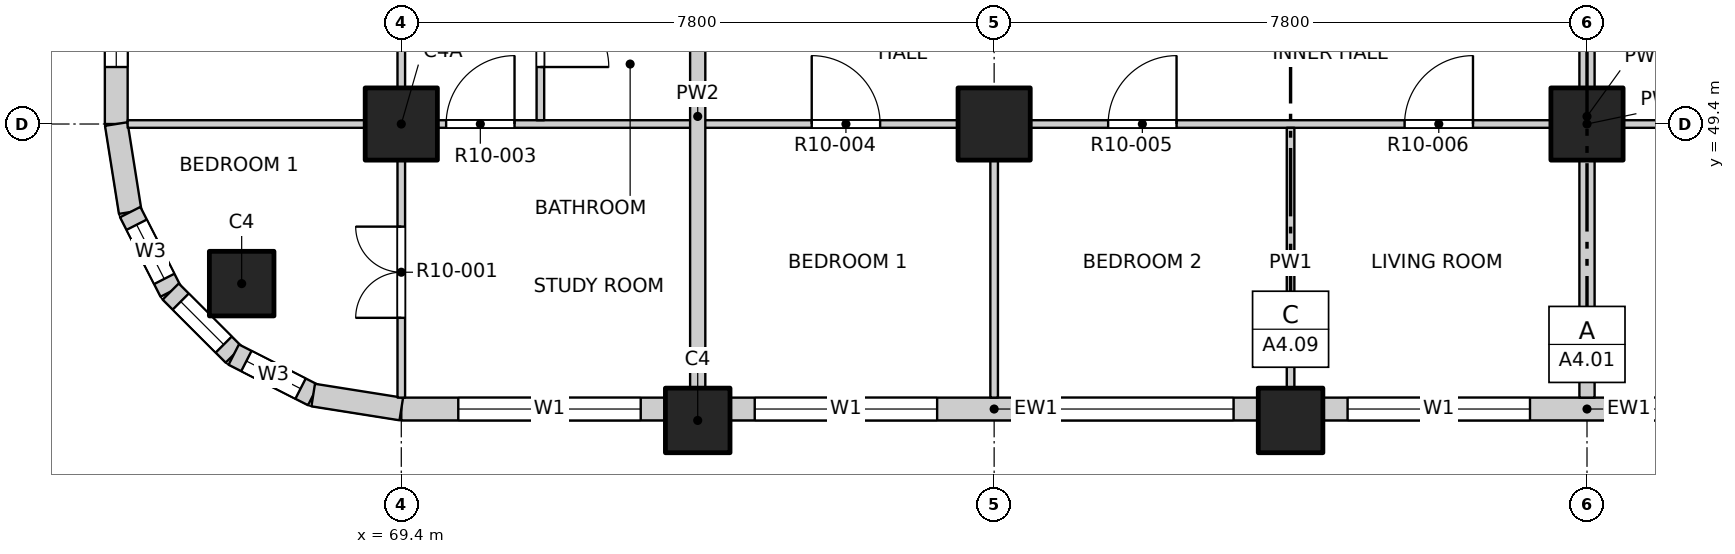
"""IFC4 building model, lengths in metres.
Left out: names, types, materials, properties, quantities, classifications, styles, units other than length and angle.
Written with IfcOpenShell. Run it as: python <this file> out.ifc"""

import sys

from ifc_helpers import new_model, si_unit, direction, frame, frame_2d, origin, origin_2d, place, context, subcontext, project, spatial, rectangle, extrude, element, fill, save


model = new_model("IFC4")
c1 = context("Model", 3, precision=1e-05, world=origin(), true_north=direction((0.0, 1.0)))
c2 = subcontext(c1, "Body", "Model", "MODEL_VIEW")
j1 = project(units=[si_unit("LENGTHUNIT", "METRE"), si_unit("PLANEANGLEUNIT", "RADIAN")], contexts=[c1])
p1 = place(None, origin())
s1 = spatial("IfcSite", under=j1, at=p1, CompositionType="ELEMENT")
p2 = place(p1, origin())
s2 = spatial("IfcBuilding", under=s1, at=p2, CompositionType="ELEMENT")
p3 = place(p2, frame((0.0, 0.0, 127.1)))
s3 = spatial("IfcBuildingStorey", under=s2, at=p3, CompositionType="ELEMENT", Elevation=127.1)
for number, where, z_axis, x_axis in (
    (1, (67.3, 47.3, -0.25), (0.0, 0.0, 1.0), (1.0, 0.0, 0.0)),
    (2, (73.3, 45.5, -0.25), (0.0, 0.0, 1.0), (1.0, 0.0, 0.0)),
    (3, (81.1, 45.5, -0.25), (0.0, 0.0, 1.0), (1.0, 0.0, 0.0)),
):
    element("IfcColumn", number, at=place(p3, frame(where, z_axis=z_axis, x_axis=x_axis)), inside=s3, PredefinedType="COLUMN", context=c2, shape_type="SweptSolid", body=[
        extrude(rectangle(XDim=0.85, YDim=0.85, at=origin_2d()), origin(), (0.0, 0.0, 1.0), 3.4),
    ])
for number, where, z_axis, x_axis in (
    (4, (69.4, 49.4, -0.25), (0.0, 0.0, 1.0), (1.0, 0.0, 0.0)),
    (5, (77.2, 49.4, -0.25), (0.0, 0.0, 1.0), (1.0, 0.0, 0.0)),
    (6, (85.0, 49.4, -0.25), (0.0, 0.0, 1.0), (1.0, 0.0, 0.0)),
):
    element("IfcColumn", number, at=place(p3, frame(where, z_axis=z_axis, x_axis=x_axis)), inside=s3, PredefinedType="COLUMN", context=c2, shape_type="SweptSolid", body=[
        extrude(rectangle(XDim=0.95, YDim=0.95, at=origin_2d()), origin(), (0.0, 0.0, 1.0), 3.4),
    ])
p4 = place(p3, frame((69.4, 45.65, 0.0), z_axis=(0.0, 0.0, 1.0), x_axis=(1.0, 0.0, 0.0)))
e7 = element("IfcWall", 7, at=p4, inside=s3, PredefinedType="SOLIDWALL", context=c2, shape_type="SweptSolid", body=[
    extrude(rectangle(XDim=3.475, YDim=0.3, at=frame_2d((1.738, 0.0))), origin(), (0.0, 0.0, 1.0), 2.7),
])
p5 = place(p4, frame((0.75, 0.0, 0.9)))
e8 = element("IfcOpeningElement", 8, at=p5, cuts=e7, PredefinedType="OPENING", context=c2, shape_type="SweptSolid", body=[
    extrude(rectangle(XDim=2.4, YDim=1.8, at=frame_2d((1.2, 0.9))), frame((0.0, 0.16, 0.0), z_axis=(0.0, -1.0, 0.0), x_axis=(1.0, 0.0, 0.0)), (0.0, 0.0, 1.0), 0.32),
])
p6 = place(p3, frame((73.725, 45.65, 0.0), z_axis=(0.0, 0.0, 1.0), x_axis=(1.0, 0.0, 0.0)))
e9 = element("IfcWall", 9, at=p6, inside=s3, PredefinedType="SOLIDWALL", context=c2, shape_type="SweptSolid", body=[
    extrude(rectangle(XDim=6.95, YDim=0.3, at=frame_2d((3.475, 0.0))), origin(), (0.0, 0.0, 1.0), 2.7),
])
p7 = place(p6, frame((0.325, 0.0, 0.9)))
e10 = element("IfcOpeningElement", 10, at=p7, cuts=e9, PredefinedType="OPENING", context=c2, shape_type="SweptSolid", body=[
    extrude(rectangle(XDim=2.4, YDim=1.8, at=frame_2d((1.2, 0.9))), frame((0.0, 0.16, 0.0), z_axis=(0.0, -1.0, 0.0), x_axis=(1.0, 0.0, 0.0)), (0.0, 0.0, 1.0), 0.32),
])
p8 = place(p6, frame((4.225, 0.0, 0.9)))
e11 = element("IfcOpeningElement", 11, at=p8, cuts=e9, PredefinedType="OPENING", context=c2, shape_type="SweptSolid", body=[
    extrude(rectangle(XDim=2.4, YDim=1.8, at=frame_2d((1.2, 0.9))), frame((0.0, 0.16, 0.0), z_axis=(0.0, -1.0, 0.0), x_axis=(1.0, 0.0, 0.0)), (0.0, 0.0, 1.0), 0.32),
])
p9 = place(p3, frame((81.525, 45.65, 0.0), z_axis=(0.0, 0.0, 1.0), x_axis=(1.0, 0.0, 0.0)))
e12 = element("IfcWall", 12, at=p9, inside=s3, PredefinedType="SOLIDWALL", context=c2, shape_type="SweptSolid", body=[
    extrude(rectangle(XDim=6.95, YDim=0.3, at=frame_2d((3.475, 0.0))), origin(), (0.0, 0.0, 1.0), 2.7),
])
p10 = place(p9, frame((0.325, 0.0, 0.9)))
e13 = element("IfcOpeningElement", 13, at=p10, cuts=e12, PredefinedType="OPENING", context=c2, shape_type="SweptSolid", body=[
    extrude(rectangle(XDim=2.4, YDim=1.8, at=frame_2d((1.2, 0.9))), frame((0.0, 0.16, 0.0), z_axis=(0.0, -1.0, 0.0), x_axis=(1.0, 0.0, 0.0)), (0.0, 0.0, 1.0), 0.32),
])
p11 = place(p9, frame((4.225, 0.0, 0.9)))
e14 = element("IfcOpeningElement", 14, at=p11, cuts=e12, PredefinedType="OPENING", context=c2, shape_type="SweptSolid", body=[
    extrude(rectangle(XDim=2.4, YDim=1.8, at=frame_2d((1.2, 0.9))), frame((0.0, 0.16, 0.0), z_axis=(0.0, -1.0, 0.0), x_axis=(1.0, 0.0, 0.0)), (0.0, 0.0, 1.0), 0.32),
])
p12 = place(p3, frame((65.65, 49.4, 0.0), z_axis=(0.0, 0.0, 1.0), x_axis=(0.0, 1.0, 0.0)))
e15 = element("IfcWall", 15, at=p12, inside=s3, PredefinedType="SOLIDWALL", context=c2, shape_type="SweptSolid", body=[
    extrude(rectangle(XDim=3.475, YDim=0.3, at=frame_2d((1.738, 0.0))), origin(), (0.0, 0.0, 1.0), 2.7),
])
p13 = place(p12, frame((0.75, 0.0, 0.9)))
e16 = element("IfcOpeningElement", 16, at=p13, cuts=e15, PredefinedType="OPENING", context=c2, shape_type="SweptSolid", body=[
    extrude(rectangle(XDim=2.4, YDim=1.8, at=frame_2d((1.2, 0.9))), frame((0.0, 0.16, 0.0), z_axis=(0.0, -1.0, 0.0), x_axis=(1.0, 0.0, 0.0)), (0.0, 0.0, 1.0), 0.32),
])
p14 = place(p3, frame((65.65, 49.4, 0.0), z_axis=(0.0, 0.0, 1.0), x_axis=(0.156496880861, -0.987678452879, 0.0)))
e17 = element("IfcWall", 17, at=p14, inside=s3, PredefinedType="SOLIDWALL", context=c2, shape_type="SweptSolid", body=[
    extrude(rectangle(XDim=1.173, YDim=0.3, at=frame_2d((0.586, 0.0))), origin(), (0.0, 0.0, 1.0), 2.7),
])
p15 = place(p3, frame((65.833, 48.241, 0.0), z_axis=(0.0, 0.0, 1.0), x_axis=(0.454025524128, -0.890988677504, 0.0)))
e18 = element("IfcWall", 18, at=p15, inside=s3, PredefinedType="SOLIDWALL", context=c2, shape_type="SweptSolid", body=[
    extrude(rectangle(XDim=1.173, YDim=0.3, at=frame_2d((0.587, 0.0))), origin(), (0.0, 0.0, 1.0), 2.7),
])
p16 = place(p15, frame((0.187, 0.0, 0.9)))
e19 = element("IfcOpeningElement", 19, at=p16, cuts=e18, PredefinedType="OPENING", context=c2, shape_type="SweptSolid", body=[
    extrude(rectangle(XDim=0.8, YDim=1.2, at=frame_2d((0.4, 0.6))), frame((0.0, 0.16, 0.0), z_axis=(0.0, -1.0, 0.0), x_axis=(1.0, 0.0, 0.0)), (0.0, 0.0, 1.0), 0.32),
])
p17 = place(p3, frame((66.366, 47.196, 0.0), z_axis=(0.0, 0.0, 1.0), x_axis=(0.707106781187, -0.707106781187, 0.0)))
e20 = element("IfcWall", 20, at=p17, inside=s3, PredefinedType="SOLIDWALL", context=c2, shape_type="SweptSolid", body=[
    extrude(rectangle(XDim=1.173, YDim=0.3, at=frame_2d((0.586, 0.0))), origin(), (0.0, 0.0, 1.0), 2.7),
])
p18 = place(p17, frame((0.187, 0.0, 0.9)))
e21 = element("IfcOpeningElement", 21, at=p18, cuts=e20, PredefinedType="OPENING", context=c2, shape_type="SweptSolid", body=[
    extrude(rectangle(XDim=0.8, YDim=1.2, at=frame_2d((0.4, 0.6))), frame((0.0, 0.16, 0.0), z_axis=(0.0, -1.0, 0.0), x_axis=(1.0, 0.0, 0.0)), (0.0, 0.0, 1.0), 0.32),
])
p19 = place(p3, frame((67.196, 46.366, 0.0), z_axis=(0.0, 0.0, 1.0), x_axis=(0.890988677504, -0.454025524128, 0.0)))
e22 = element("IfcWall", 22, at=p19, inside=s3, PredefinedType="SOLIDWALL", context=c2, shape_type="SweptSolid", body=[
    extrude(rectangle(XDim=1.173, YDim=0.3, at=frame_2d((0.587, 0.0))), origin(), (0.0, 0.0, 1.0), 2.7),
])
p20 = place(p19, frame((0.187, 0.0, 0.9)))
e23 = element("IfcOpeningElement", 23, at=p20, cuts=e22, PredefinedType="OPENING", context=c2, shape_type="SweptSolid", body=[
    extrude(rectangle(XDim=0.8, YDim=1.2, at=frame_2d((0.4, 0.6))), frame((0.0, 0.16, 0.0), z_axis=(0.0, -1.0, 0.0), x_axis=(1.0, 0.0, 0.0)), (0.0, 0.0, 1.0), 0.32),
])
p21 = place(p3, frame((68.241, 45.833, 0.0), z_axis=(0.0, 0.0, 1.0), x_axis=(0.987678452879, -0.156496880861, 0.0)))
e24 = element("IfcWall", 24, at=p21, inside=s3, PredefinedType="SOLIDWALL", context=c2, shape_type="SweptSolid", body=[
    extrude(rectangle(XDim=1.173, YDim=0.3, at=frame_2d((0.586, 0.0))), origin(), (0.0, 0.0, 1.0), 2.7),
])
p22 = place(p3, frame((65.8, 49.4, 0.0), z_axis=(0.0, 0.0, 1.0), x_axis=(1.0, 0.0, 0.0)))
e25 = element("IfcWall", 25, at=p22, inside=s3, PredefinedType="PARTITIONING", context=c2, shape_type="SweptSolid", body=[
    extrude(rectangle(XDim=38.4, YDim=0.1, at=frame_2d((19.2, 0.0))), origin(), (0.0, 0.0, 1.0), 3.15),
])
p23 = place(p22, frame((4.19, 0.0, 0.0)))
e26 = element("IfcOpeningElement", 26, at=p23, cuts=e25, PredefinedType="OPENING", context=c2, shape_type="SweptSolid", body=[
    extrude(rectangle(XDim=0.9, YDim=2.1, at=frame_2d((0.45, 1.05))), frame((0.0, 0.06, 0.0), z_axis=(0.0, -1.0, 0.0), x_axis=(1.0, 0.0, 0.0)), (0.0, 0.0, 1.0), 0.12),
])
p24 = place(p22, frame((9.0, 0.0, 0.0)))
e27 = element("IfcOpeningElement", 27, at=p24, cuts=e25, PredefinedType="OPENING", context=c2, shape_type="SweptSolid", body=[
    extrude(rectangle(XDim=0.9, YDim=2.1, at=frame_2d((0.45, 1.05))), frame((0.0, 0.06, 0.0), z_axis=(0.0, -1.0, 0.0), x_axis=(1.0, 0.0, 0.0)), (0.0, 0.0, 1.0), 0.12),
])
p25 = place(p22, frame((12.9, 0.0, 0.0)))
e28 = element("IfcOpeningElement", 28, at=p25, cuts=e25, PredefinedType="OPENING", context=c2, shape_type="SweptSolid", body=[
    extrude(rectangle(XDim=0.9, YDim=2.1, at=frame_2d((0.45, 1.05))), frame((0.0, 0.06, 0.0), z_axis=(0.0, -1.0, 0.0), x_axis=(1.0, 0.0, 0.0)), (0.0, 0.0, 1.0), 0.12),
])
p26 = place(p22, frame((16.8, 0.0, 0.0)))
e29 = element("IfcOpeningElement", 29, at=p26, cuts=e25, PredefinedType="OPENING", context=c2, shape_type="SweptSolid", body=[
    extrude(rectangle(XDim=0.9, YDim=2.1, at=frame_2d((0.45, 1.05))), frame((0.0, 0.06, 0.0), z_axis=(0.0, -1.0, 0.0), x_axis=(1.0, 0.0, 0.0)), (0.0, 0.0, 1.0), 0.12),
])
p27 = place(p22, frame((22.5, 0.0, 0.0)))
e30 = element("IfcOpeningElement", 30, at=p27, cuts=e25, PredefinedType="OPENING", context=c2, shape_type="SweptSolid", body=[
    extrude(rectangle(XDim=1.2, YDim=2.1, at=frame_2d((0.6, 1.05))), frame((0.0, 0.06, 0.0), z_axis=(0.0, -1.0, 0.0), x_axis=(1.0, 0.0, 0.0)), (0.0, 0.0, 1.0), 0.12),
])
p28 = place(p22, frame((28.5, 0.0, 0.0)))
e31 = element("IfcOpeningElement", 31, at=p28, cuts=e25, PredefinedType="OPENING", context=c2, shape_type="SweptSolid", body=[
    extrude(rectangle(XDim=0.9, YDim=2.1, at=frame_2d((0.45, 1.05))), frame((0.0, 0.06, 0.0), z_axis=(0.0, -1.0, 0.0), x_axis=(1.0, 0.0, 0.0)), (0.0, 0.0, 1.0), 0.12),
])
p29 = place(p22, frame((33.31, 0.0, 0.0)))
e32 = element("IfcOpeningElement", 32, at=p29, cuts=e25, PredefinedType="OPENING", context=c2, shape_type="SweptSolid", body=[
    extrude(rectangle(XDim=0.9, YDim=2.1, at=frame_2d((0.45, 1.05))), frame((0.0, 0.06, 0.0), z_axis=(0.0, -1.0, 0.0), x_axis=(1.0, 0.0, 0.0)), (0.0, 0.0, 1.0), 0.12),
])
p30 = place(p3, frame((69.4, 45.8, 0.0), z_axis=(0.0, 0.0, 1.0), x_axis=(0.0, 1.0, 0.0)))
e33 = element("IfcWall", 33, at=p30, inside=s3, PredefinedType="PARTITIONING", context=c2, shape_type="SweptSolid", body=[
    extrude(rectangle(XDim=38.4, YDim=0.1, at=frame_2d((19.2, 0.0))), origin(), (0.0, 0.0, 1.0), 3.15),
])
p31 = place(p30, frame((1.05, 0.0, 0.0)))
e34 = element("IfcOpeningElement", 34, at=p31, cuts=e33, PredefinedType="OPENING", context=c2, shape_type="SweptSolid", body=[
    extrude(rectangle(XDim=1.2, YDim=2.1, at=frame_2d((0.6, 1.05))), frame((0.0, 0.06, 0.0), z_axis=(0.0, -1.0, 0.0), x_axis=(1.0, 0.0, 0.0)), (0.0, 0.0, 1.0), 0.12),
])
p32 = place(p30, frame((5.1, 0.0, 0.0)))
e35 = element("IfcOpeningElement", 35, at=p32, cuts=e33, PredefinedType="OPENING", context=c2, shape_type="SweptSolid", body=[
    extrude(rectangle(XDim=0.9, YDim=2.1, at=frame_2d((0.45, 1.05))), frame((0.0, 0.06, 0.0), z_axis=(0.0, -1.0, 0.0), x_axis=(1.0, 0.0, 0.0)), (0.0, 0.0, 1.0), 0.12),
])
p33 = place(p30, frame((9.0, 0.0, 0.0)))
e36 = element("IfcOpeningElement", 36, at=p33, cuts=e33, PredefinedType="OPENING", context=c2, shape_type="SweptSolid", body=[
    extrude(rectangle(XDim=0.9, YDim=2.1, at=frame_2d((0.45, 1.05))), frame((0.0, 0.06, 0.0), z_axis=(0.0, -1.0, 0.0), x_axis=(1.0, 0.0, 0.0)), (0.0, 0.0, 1.0), 0.12),
])
p34 = place(p30, frame((12.9, 0.0, 0.0)))
e37 = element("IfcOpeningElement", 37, at=p34, cuts=e33, PredefinedType="OPENING", context=c2, shape_type="SweptSolid", body=[
    extrude(rectangle(XDim=0.9, YDim=2.1, at=frame_2d((0.45, 1.05))), frame((0.0, 0.06, 0.0), z_axis=(0.0, -1.0, 0.0), x_axis=(1.0, 0.0, 0.0)), (0.0, 0.0, 1.0), 0.12),
])
p35 = place(p30, frame((19.775, 0.0, 0.0)))
e38 = element("IfcOpeningElement", 38, at=p35, cuts=e33, PredefinedType="OPENING", context=c2, shape_type="SweptSolid", body=[
    extrude(rectangle(XDim=1.2, YDim=2.1, at=frame_2d((0.6, 1.05))), frame((0.0, 0.06, 0.0), z_axis=(0.0, -1.0, 0.0), x_axis=(1.0, 0.0, 0.0)), (0.0, 0.0, 1.0), 0.12),
])
p36 = place(p30, frame((24.6, 0.0, 0.0)))
e39 = element("IfcOpeningElement", 39, at=p36, cuts=e33, PredefinedType="OPENING", context=c2, shape_type="SweptSolid", body=[
    extrude(rectangle(XDim=0.9, YDim=2.1, at=frame_2d((0.45, 1.05))), frame((0.0, 0.06, 0.0), z_axis=(0.0, -1.0, 0.0), x_axis=(1.0, 0.0, 0.0)), (0.0, 0.0, 1.0), 0.12),
])
p37 = place(p30, frame((30.3, 0.0, 0.0)))
e40 = element("IfcOpeningElement", 40, at=p37, cuts=e33, PredefinedType="OPENING", context=c2, shape_type="SweptSolid", body=[
    extrude(rectangle(XDim=1.2, YDim=2.1, at=frame_2d((0.6, 1.05))), frame((0.0, 0.06, 0.0), z_axis=(0.0, -1.0, 0.0), x_axis=(1.0, 0.0, 0.0)), (0.0, 0.0, 1.0), 0.12),
])
p38 = place(p30, frame((36.15, 0.0, 0.0)))
e41 = element("IfcOpeningElement", 41, at=p38, cuts=e33, PredefinedType="OPENING", context=c2, shape_type="SweptSolid", body=[
    extrude(rectangle(XDim=1.2, YDim=2.1, at=frame_2d((0.6, 1.05))), frame((0.0, 0.06, 0.0), z_axis=(0.0, -1.0, 0.0), x_axis=(1.0, 0.0, 0.0)), (0.0, 0.0, 1.0), 0.12),
])
p39 = place(p3, frame((71.23, 49.45, 0.0), z_axis=(0.0, 0.0, 1.0), x_axis=(0.0, 1.0, 0.0)))
e42 = element("IfcWall", 42, at=p39, inside=s3, PredefinedType="PARTITIONING", context=c2, shape_type="SweptSolid", body=[
    extrude(rectangle(XDim=5.8, YDim=0.1, at=frame_2d((2.9, 0.0))), origin(), (0.0, 0.0, 1.0), 3.15),
])
p40 = place(p39, frame((0.7, 0.0, 0.0)))
e43 = element("IfcOpeningElement", 43, at=p40, cuts=e42, PredefinedType="OPENING", context=c2, shape_type="SweptSolid", body=[
    extrude(rectangle(XDim=0.9, YDim=2.1, at=frame_2d((0.45, 1.05))), frame((0.0, 0.06, 0.0), z_axis=(0.0, -1.0, 0.0), x_axis=(1.0, 0.0, 0.0)), (0.0, 0.0, 1.0), 0.12),
])
p41 = place(p39, frame((3.65, 0.0, 0.0)))
e44 = element("IfcOpeningElement", 44, at=p41, cuts=e42, PredefinedType="OPENING", context=c2, shape_type="SweptSolid", body=[
    extrude(rectangle(XDim=0.9, YDim=2.1, at=frame_2d((0.45, 1.05))), frame((0.0, 0.06, 0.0), z_axis=(0.0, -1.0, 0.0), x_axis=(1.0, 0.0, 0.0)), (0.0, 0.0, 1.0), 0.12),
])
p42 = place(p3, frame((73.3, 45.8, 0.0), z_axis=(0.0, 0.0, 1.0), x_axis=(0.0, 1.0, 0.0)))
e45 = element("IfcWall", 45, at=p42, inside=s3, PredefinedType="PARTITIONING", context=c2, shape_type="SweptSolid", body=[
    extrude(rectangle(XDim=7.4, YDim=0.2, at=frame_2d((3.7, 0.0))), origin(), (0.0, 0.0, 1.0), 3.15),
])
p43 = place(p3, frame((77.2, 45.8, 0.0), z_axis=(0.0, 0.0, 1.0), x_axis=(0.0, 1.0, 0.0)))
e46 = element("IfcWall", 46, at=p43, inside=s3, PredefinedType="PARTITIONING", context=c2, shape_type="SweptSolid", body=[
    extrude(rectangle(XDim=3.55, YDim=0.1, at=frame_2d((1.775, 0.0))), origin(), (0.0, 0.0, 1.0), 3.15),
])
p44 = place(p3, frame((81.1, 45.8, 0.0), z_axis=(0.0, 0.0, 1.0), x_axis=(0.0, 1.0, 0.0)))
e47 = element("IfcWall", 47, at=p44, inside=s3, PredefinedType="PARTITIONING", context=c2, shape_type="SweptSolid", body=[
    extrude(rectangle(XDim=3.55, YDim=0.1, at=frame_2d((1.775, 0.0))), origin(), (0.0, 0.0, 1.0), 2.55),
])
p45 = place(p3, frame((85.0, 45.8, 0.0), z_axis=(0.0, 0.0, 1.0), x_axis=(0.0, 1.0, 0.0)))
e48 = element("IfcWall", 48, at=p45, inside=s3, PredefinedType="PARTITIONING", context=c2, shape_type="SweptSolid", body=[
    extrude(rectangle(XDim=7.4, YDim=0.2, at=frame_2d((3.7, 0.0))), origin(), (0.0, 0.0, 1.0), 3.15),
])
p46 = place(p5, origin())
e49 = element("IfcWindow", 49, at=p46, inside=s3, PartitioningType="DOUBLE_PANEL_VERTICAL", PredefinedType="WINDOW", context=c2, shape_type="SweptSolid", body=[
    extrude(rectangle(XDim=2.4, YDim=1.8, at=frame_2d((1.2, 0.9))), frame((0.0, 0.03, 0.0), z_axis=(0.0, -1.0, 0.0), x_axis=(1.0, 0.0, 0.0)), (0.0, 0.0, 1.0), 0.06),
])
fill(e8, e49)
p47 = place(p7, origin())
e50 = element("IfcWindow", 50, at=p47, inside=s3, PartitioningType="DOUBLE_PANEL_VERTICAL", PredefinedType="WINDOW", context=c2, shape_type="SweptSolid", body=[
    extrude(rectangle(XDim=2.4, YDim=1.8, at=frame_2d((1.2, 0.9))), frame((0.0, 0.03, 0.0), z_axis=(0.0, -1.0, 0.0), x_axis=(1.0, 0.0, 0.0)), (0.0, 0.0, 1.0), 0.06),
])
fill(e10, e50)
p48 = place(p8, origin())
e51 = element("IfcWindow", 51, at=p48, inside=s3, PartitioningType="DOUBLE_PANEL_VERTICAL", PredefinedType="WINDOW", context=c2, shape_type="SweptSolid", body=[
    extrude(rectangle(XDim=2.4, YDim=1.8, at=frame_2d((1.2, 0.9))), frame((0.0, 0.03, 0.0), z_axis=(0.0, -1.0, 0.0), x_axis=(1.0, 0.0, 0.0)), (0.0, 0.0, 1.0), 0.06),
])
fill(e11, e51)
p49 = place(p10, origin())
e52 = element("IfcWindow", 52, at=p49, inside=s3, PartitioningType="DOUBLE_PANEL_VERTICAL", PredefinedType="WINDOW", context=c2, shape_type="SweptSolid", body=[
    extrude(rectangle(XDim=2.4, YDim=1.8, at=frame_2d((1.2, 0.9))), frame((0.0, 0.03, 0.0), z_axis=(0.0, -1.0, 0.0), x_axis=(1.0, 0.0, 0.0)), (0.0, 0.0, 1.0), 0.06),
])
fill(e13, e52)
p50 = place(p11, origin())
e53 = element("IfcWindow", 53, at=p50, inside=s3, PartitioningType="DOUBLE_PANEL_VERTICAL", PredefinedType="WINDOW", context=c2, shape_type="SweptSolid", body=[
    extrude(rectangle(XDim=2.4, YDim=1.8, at=frame_2d((1.2, 0.9))), frame((0.0, 0.03, 0.0), z_axis=(0.0, -1.0, 0.0), x_axis=(1.0, 0.0, 0.0)), (0.0, 0.0, 1.0), 0.06),
])
fill(e14, e53)
p51 = place(p13, origin())
e54 = element("IfcWindow", 54, at=p51, inside=s3, PartitioningType="DOUBLE_PANEL_VERTICAL", PredefinedType="WINDOW", context=c2, shape_type="SweptSolid", body=[
    extrude(rectangle(XDim=2.4, YDim=1.8, at=frame_2d((1.2, 0.9))), frame((0.0, 0.03, 0.0), z_axis=(0.0, -1.0, 0.0), x_axis=(1.0, 0.0, 0.0)), (0.0, 0.0, 1.0), 0.06),
])
fill(e16, e54)
p52 = place(p16, origin())
e55 = element("IfcWindow", 55, at=p52, inside=s3, PartitioningType="SINGLE_PANEL", PredefinedType="WINDOW", context=c2, shape_type="SweptSolid", body=[
    extrude(rectangle(XDim=0.8, YDim=1.2, at=frame_2d((0.4, 0.6))), frame((0.0, 0.03, 0.0), z_axis=(0.0, -1.0, 0.0), x_axis=(1.0, 0.0, 0.0)), (0.0, 0.0, 1.0), 0.06),
])
fill(e19, e55)
p53 = place(p18, origin())
e56 = element("IfcWindow", 56, at=p53, inside=s3, PartitioningType="SINGLE_PANEL", PredefinedType="WINDOW", context=c2, shape_type="SweptSolid", body=[
    extrude(rectangle(XDim=0.8, YDim=1.2, at=frame_2d((0.4, 0.6))), frame((0.0, 0.03, 0.0), z_axis=(0.0, -1.0, 0.0), x_axis=(1.0, 0.0, 0.0)), (0.0, 0.0, 1.0), 0.06),
])
fill(e21, e56)
p54 = place(p20, origin())
e57 = element("IfcWindow", 57, at=p54, inside=s3, PartitioningType="SINGLE_PANEL", PredefinedType="WINDOW", context=c2, shape_type="SweptSolid", body=[
    extrude(rectangle(XDim=0.8, YDim=1.2, at=frame_2d((0.4, 0.6))), frame((0.0, 0.03, 0.0), z_axis=(0.0, -1.0, 0.0), x_axis=(1.0, 0.0, 0.0)), (0.0, 0.0, 1.0), 0.06),
])
fill(e23, e57)
p55 = place(p31, origin())
e58 = element("IfcDoor", 58, at=p55, inside=s3, OperationType="DOUBLE_DOOR_SINGLE_SWING", PredefinedType="DOOR", context=c2, shape_type="SweptSolid", body=[
    extrude(rectangle(XDim=1.2, YDim=2.1, at=frame_2d((0.6, 1.05))), frame((0.0, 0.025, 0.0), z_axis=(0.0, -1.0, 0.0), x_axis=(1.0, 0.0, 0.0)), (0.0, 0.0, 1.0), 0.05),
])
fill(e34, e58)
p56 = place(p23, origin())
e59 = element("IfcDoor", 59, at=p56, inside=s3, OperationType="SINGLE_SWING_RIGHT", PredefinedType="DOOR", context=c2, shape_type="SweptSolid", body=[
    extrude(rectangle(XDim=0.9, YDim=2.1, at=frame_2d((0.45, 1.05))), frame((0.0, 0.025, 0.0), z_axis=(0.0, -1.0, 0.0), x_axis=(1.0, 0.0, 0.0)), (0.0, 0.0, 1.0), 0.05),
])
fill(e26, e59)
p57 = place(p24, origin())
e60 = element("IfcDoor", 60, at=p57, inside=s3, OperationType="SINGLE_SWING_LEFT", PredefinedType="DOOR", context=c2, shape_type="SweptSolid", body=[
    extrude(rectangle(XDim=0.9, YDim=2.1, at=frame_2d((0.45, 1.05))), frame((0.0, 0.025, 0.0), z_axis=(0.0, -1.0, 0.0), x_axis=(1.0, 0.0, 0.0)), (0.0, 0.0, 1.0), 0.05),
])
fill(e27, e60)
p58 = place(p25, origin())
e61 = element("IfcDoor", 61, at=p58, inside=s3, OperationType="SINGLE_SWING_RIGHT", PredefinedType="DOOR", context=c2, shape_type="SweptSolid", body=[
    extrude(rectangle(XDim=0.9, YDim=2.1, at=frame_2d((0.45, 1.05))), frame((0.0, 0.025, 0.0), z_axis=(0.0, -1.0, 0.0), x_axis=(1.0, 0.0, 0.0)), (0.0, 0.0, 1.0), 0.05),
])
fill(e28, e61)
p59 = place(p26, origin())
e62 = element("IfcDoor", 62, at=p59, inside=s3, OperationType="SINGLE_SWING_RIGHT", PredefinedType="DOOR", context=c2, shape_type="SweptSolid", body=[
    extrude(rectangle(XDim=0.9, YDim=2.1, at=frame_2d((0.45, 1.05))), frame((0.0, 0.025, 0.0), z_axis=(0.0, -1.0, 0.0), x_axis=(1.0, 0.0, 0.0)), (0.0, 0.0, 1.0), 0.05),
])
fill(e29, e62)
p60 = place(p40, origin())
e63 = element("IfcDoor", 63, at=p60, inside=s3, OperationType="SINGLE_SWING_RIGHT", PredefinedType="DOOR", context=c2, shape_type="SweptSolid", body=[
    extrude(rectangle(XDim=0.9, YDim=2.1, at=frame_2d((0.45, 1.05))), frame((0.0, 0.025, 0.0), z_axis=(0.0, -1.0, 0.0), x_axis=(1.0, 0.0, 0.0)), (0.0, 0.0, 1.0), 0.05),
])
fill(e43, e63)
save(model, sys.argv[1])
